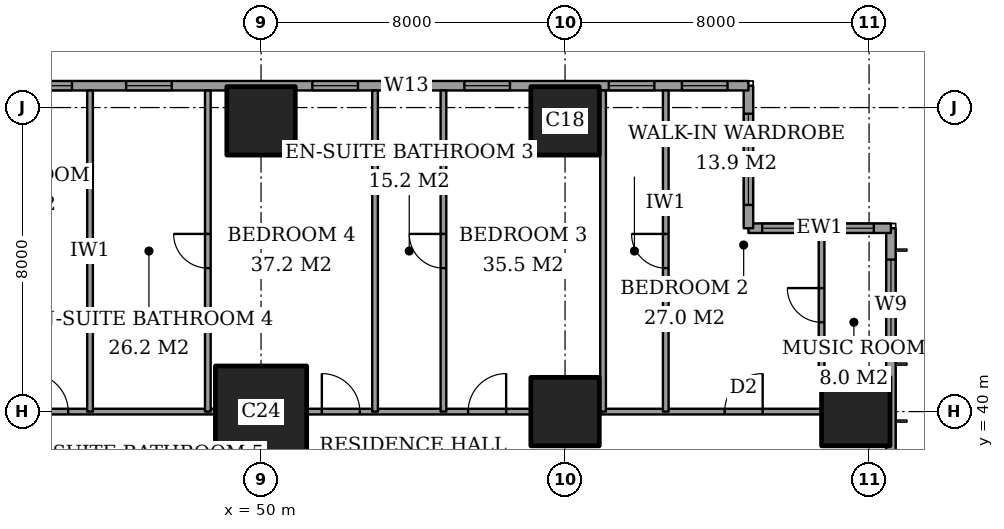
"""IFC4 building model, lengths in metres.
Left out: names, types, materials, properties, quantities, classifications, styles, units other than length and angle.
Written with IfcOpenShell. Run it as: python <this file> out.ifc"""

import sys

from ifc_helpers import new_model, si_unit, direction, frame, frame_2d, origin, origin_2d, place, context, subcontext, project, spatial, rectangle, extrude, element, fill, save


model = new_model("IFC4")
c1 = context("Model", 3, precision=1e-05, world=origin(), true_north=direction((0.0, 1.0)))
c2 = subcontext(c1, "Body", "Model", "MODEL_VIEW")
j1 = project(units=[si_unit("LENGTHUNIT", "METRE"), si_unit("PLANEANGLEUNIT", "RADIAN")], contexts=[c1])
p1 = place(None, origin())
s1 = spatial("IfcSite", under=j1, at=p1, CompositionType="ELEMENT")
p2 = place(p1, origin())
s2 = spatial("IfcBuilding", under=s1, at=p2, CompositionType="ELEMENT")
p3 = place(p2, frame((0.0, 0.0, 189.4)))
s3 = spatial("IfcBuildingStorey", under=s2, at=p3, CompositionType="ELEMENT", Elevation=189.4)
p4 = place(p3, frame((50.0, 40.0, 0.0), z_axis=(0.0, 0.0, 1.0), x_axis=(1.0, 0.0, 0.0)))
e1 = element("IfcColumn", 1, at=p4, inside=s3, PredefinedType="COLUMN", context=c2, shape_type="SweptSolid", body=[
    extrude(rectangle(XDim=2.4, YDim=2.4, at=origin_2d()), origin(), (0.0, 0.0, 1.0), 3.6),
])
for number, where, z_axis, x_axis in (
    (2, (50.0, 47.65, 0.0), (0.0, 0.0, 1.0), (1.0, 0.0, 0.0)),
    (3, (58.0, 40.0, 0.0), (0.0, 0.0, 1.0), (1.0, 0.0, 0.0)),
    (4, (58.0, 47.65, 0.0), (0.0, 0.0, 1.0), (1.0, 0.0, 0.0)),
    (5, (65.65, 40.0, 0.0), (0.0, 0.0, 1.0), (1.0, 0.0, 0.0)),
):
    element("IfcColumn", number, at=place(p3, frame(where, z_axis=z_axis, x_axis=x_axis)), inside=s3, PredefinedType="COLUMN", context=c2, shape_type="SweptSolid", body=[
        extrude(rectangle(XDim=1.8, YDim=1.8, at=origin_2d()), origin(), (0.0, 0.0, 1.0), 3.6),
    ])
p5 = place(p3, frame((66.575, 3.175, 0.0), z_axis=(0.0, 0.0, 1.0), x_axis=(0.0, 1.0, 0.0)))
e6 = element("IfcWall", 6, at=p5, inside=s3, PredefinedType="SOLIDWALL", context=c2, shape_type="SweptSolid", body=[
    extrude(rectangle(XDim=41.65, YDim=0.25, at=frame_2d((20.825, 0.0))), origin(), (0.0, 0.0, 1.0), 3.6),
])
p6 = place(p5, frame((0.825, 0.0, 0.2)))
e7 = element("IfcOpeningElement", 7, at=p6, cuts=e6, PredefinedType="OPENING", context=c2, shape_type="SweptSolid", body=[
    extrude(rectangle(XDim=2.4, YDim=2.4, at=frame_2d((1.2, 1.2))), frame((0.0, 0.135, 0.0), z_axis=(0.0, -1.0, 0.0), x_axis=(1.0, 0.0, 0.0)), (0.0, 0.0, 1.0), 0.27),
])
p7 = place(p5, frame((6.6, 0.0, 0.2)))
e8 = element("IfcOpeningElement", 8, at=p7, cuts=e6, PredefinedType="OPENING", context=c2, shape_type="SweptSolid", body=[
    extrude(rectangle(XDim=1.2, YDim=2.4, at=frame_2d((0.6, 1.2))), frame((0.0, 0.135, 0.0), z_axis=(0.0, -1.0, 0.0), x_axis=(1.0, 0.0, 0.0)), (0.0, 0.0, 1.0), 0.27),
])
p8 = place(p5, frame((8.775, 0.0, 0.2)))
e9 = element("IfcOpeningElement", 9, at=p8, cuts=e6, PredefinedType="OPENING", context=c2, shape_type="SweptSolid", body=[
    extrude(rectangle(XDim=2.4, YDim=2.4, at=frame_2d((1.2, 1.2))), frame((0.0, 0.135, 0.0), z_axis=(0.0, -1.0, 0.0), x_axis=(1.0, 0.0, 0.0)), (0.0, 0.0, 1.0), 0.27),
])
p9 = place(p5, frame((15.675, 0.0, 0.2)))
e10 = element("IfcOpeningElement", 10, at=p9, cuts=e6, PredefinedType="OPENING", context=c2, shape_type="SweptSolid", body=[
    extrude(rectangle(XDim=2.4, YDim=2.4, at=frame_2d((1.2, 1.2))), frame((0.0, 0.135, 0.0), z_axis=(0.0, -1.0, 0.0), x_axis=(1.0, 0.0, 0.0)), (0.0, 0.0, 1.0), 0.27),
])
p10 = place(p5, frame((23.575, 0.0, 0.2)))
e11 = element("IfcOpeningElement", 11, at=p10, cuts=e6, PredefinedType="OPENING", context=c2, shape_type="SweptSolid", body=[
    extrude(rectangle(XDim=2.4, YDim=2.4, at=frame_2d((1.2, 1.2))), frame((0.0, 0.135, 0.0), z_axis=(0.0, -1.0, 0.0), x_axis=(1.0, 0.0, 0.0)), (0.0, 0.0, 1.0), 0.27),
])
p11 = place(p5, frame((30.775, 0.0, 0.2)))
e12 = element("IfcOpeningElement", 12, at=p11, cuts=e6, PredefinedType="OPENING", context=c2, shape_type="SweptSolid", body=[
    extrude(rectangle(XDim=2.4, YDim=2.4, at=frame_2d((1.2, 1.2))), frame((0.0, 0.135, 0.0), z_axis=(0.0, -1.0, 0.0), x_axis=(1.0, 0.0, 0.0)), (0.0, 0.0, 1.0), 0.27),
])
p12 = place(p5, frame((34.55, 0.0, 0.2)))
e13 = element("IfcOpeningElement", 13, at=p12, cuts=e6, PredefinedType="OPENING", context=c2, shape_type="SweptSolid", body=[
    extrude(rectangle(XDim=1.2, YDim=2.4, at=frame_2d((0.6, 1.2))), frame((0.0, 0.135, 0.0), z_axis=(0.0, -1.0, 0.0), x_axis=(1.0, 0.0, 0.0)), (0.0, 0.0, 1.0), 0.27),
])
p13 = place(p5, frame((38.425, 0.0, 0.2)))
e14 = element("IfcOpeningElement", 14, at=p13, cuts=e6, PredefinedType="OPENING", context=c2, shape_type="SweptSolid", body=[
    extrude(rectangle(XDim=2.4, YDim=2.4, at=frame_2d((1.2, 1.2))), frame((0.0, 0.135, 0.0), z_axis=(0.0, -1.0, 0.0), x_axis=(1.0, 0.0, 0.0)), (0.0, 0.0, 1.0), 0.27),
])
p14 = place(p3, frame((66.575, 44.825, 0.0), z_axis=(0.0, 0.0, 1.0), x_axis=(-1.0, 0.0, 0.0)))
e15 = element("IfcWall", 15, at=p14, inside=s3, PredefinedType="SOLIDWALL", context=c2, shape_type="SweptSolid", body=[
    extrude(rectangle(XDim=3.75, YDim=0.25, at=frame_2d((1.875, 0.0))), origin(), (0.0, 0.0, 1.0), 3.6),
])
p15 = place(p14, frame((0.45, 0.0, 0.2)))
e16 = element("IfcOpeningElement", 16, at=p15, cuts=e15, PredefinedType="OPENING", context=c2, shape_type="SweptSolid", body=[
    extrude(rectangle(XDim=1.2, YDim=2.4, at=frame_2d((0.6, 1.2))), frame((0.0, 0.135, 0.0), z_axis=(0.0, -1.0, 0.0), x_axis=(1.0, 0.0, 0.0)), (0.0, 0.0, 1.0), 0.27),
])
p16 = place(p14, frame((2.188, 0.0, 0.2)))
e17 = element("IfcOpeningElement", 17, at=p16, cuts=e15, PredefinedType="OPENING", context=c2, shape_type="SweptSolid", body=[
    extrude(rectangle(XDim=1.2, YDim=2.4, at=frame_2d((0.6, 1.2))), frame((0.0, 0.135, 0.0), z_axis=(0.0, -1.0, 0.0), x_axis=(1.0, 0.0, 0.0)), (0.0, 0.0, 1.0), 0.27),
])
p17 = place(p3, frame((62.825, 44.825, 0.0), z_axis=(0.0, 0.0, 1.0), x_axis=(0.0, 1.0, 0.0)))
e18 = element("IfcWall", 18, at=p17, inside=s3, PredefinedType="SOLIDWALL", context=c2, shape_type="SweptSolid", body=[
    extrude(rectangle(XDim=3.75, YDim=0.25, at=frame_2d((1.875, 0.0))), origin(), (0.0, 0.0, 1.0), 3.6),
])
p18 = place(p17, frame((0.613, 0.0, 0.2)))
e19 = element("IfcOpeningElement", 19, at=p18, cuts=e18, PredefinedType="OPENING", context=c2, shape_type="SweptSolid", body=[
    extrude(rectangle(XDim=2.4, YDim=2.4, at=frame_2d((1.2, 1.2))), frame((0.0, 0.135, 0.0), z_axis=(0.0, -1.0, 0.0), x_axis=(1.0, 0.0, 0.0)), (0.0, 0.0, 1.0), 0.27),
])
p19 = place(p3, frame((62.825, 48.575, 0.0), z_axis=(0.0, 0.0, 1.0), x_axis=(-1.0, 0.0, 0.0)))
e20 = element("IfcWall", 20, at=p19, inside=s3, PredefinedType="SOLIDWALL", context=c2, shape_type="SweptSolid", body=[
    extrude(rectangle(XDim=21.4, YDim=0.25, at=frame_2d((10.7, 0.0))), origin(), (0.0, 0.0, 1.0), 3.6),
])
p20 = place(p19, frame((0.55, 0.0, 0.2)))
e21 = element("IfcOpeningElement", 21, at=p20, cuts=e20, PredefinedType="OPENING", context=c2, shape_type="SweptSolid", body=[
    extrude(rectangle(XDim=1.2, YDim=2.4, at=frame_2d((0.6, 1.2))), frame((0.0, 0.135, 0.0), z_axis=(0.0, -1.0, 0.0), x_axis=(1.0, 0.0, 0.0)), (0.0, 0.0, 1.0), 0.27),
])
p21 = place(p19, frame((2.475, 0.0, 0.2)))
e22 = element("IfcOpeningElement", 22, at=p21, cuts=e20, PredefinedType="OPENING", context=c2, shape_type="SweptSolid", body=[
    extrude(rectangle(XDim=1.2, YDim=2.4, at=frame_2d((0.6, 1.2))), frame((0.0, 0.135, 0.0), z_axis=(0.0, -1.0, 0.0), x_axis=(1.0, 0.0, 0.0)), (0.0, 0.0, 1.0), 0.27),
])
p22 = place(p19, frame((6.275, 0.0, 0.2)))
e23 = element("IfcOpeningElement", 23, at=p22, cuts=e20, PredefinedType="OPENING", context=c2, shape_type="SweptSolid", body=[
    extrude(rectangle(XDim=1.2, YDim=2.4, at=frame_2d((0.6, 1.2))), frame((0.0, 0.135, 0.0), z_axis=(0.0, -1.0, 0.0), x_axis=(1.0, 0.0, 0.0)), (0.0, 0.0, 1.0), 0.27),
])
p23 = place(p19, frame((8.4, 0.0, 0.2)))
e24 = element("IfcOpeningElement", 24, at=p23, cuts=e20, PredefinedType="OPENING", context=c2, shape_type="SweptSolid", body=[
    extrude(rectangle(XDim=1.2, YDim=2.4, at=frame_2d((0.6, 1.2))), frame((0.0, 0.135, 0.0), z_axis=(0.0, -1.0, 0.0), x_axis=(1.0, 0.0, 0.0)), (0.0, 0.0, 1.0), 0.27),
])
p24 = place(p19, frame((10.275, 0.0, 0.2)))
e25 = element("IfcOpeningElement", 25, at=p24, cuts=e20, PredefinedType="OPENING", context=c2, shape_type="SweptSolid", body=[
    extrude(rectangle(XDim=1.2, YDim=2.4, at=frame_2d((0.6, 1.2))), frame((0.0, 0.135, 0.0), z_axis=(0.0, -1.0, 0.0), x_axis=(1.0, 0.0, 0.0)), (0.0, 0.0, 1.0), 0.27),
])
p25 = place(p19, frame((15.175, 0.0, 0.2)))
e26 = element("IfcOpeningElement", 26, at=p25, cuts=e20, PredefinedType="OPENING", context=c2, shape_type="SweptSolid", body=[
    extrude(rectangle(XDim=1.2, YDim=2.4, at=frame_2d((0.6, 1.2))), frame((0.0, 0.135, 0.0), z_axis=(0.0, -1.0, 0.0), x_axis=(1.0, 0.0, 0.0)), (0.0, 0.0, 1.0), 0.27),
])
p26 = place(p19, frame((17.8, 0.0, 0.2)))
e27 = element("IfcOpeningElement", 27, at=p26, cuts=e20, PredefinedType="OPENING", context=c2, shape_type="SweptSolid", body=[
    extrude(rectangle(XDim=1.2, YDim=2.4, at=frame_2d((0.6, 1.2))), frame((0.0, 0.135, 0.0), z_axis=(0.0, -1.0, 0.0), x_axis=(1.0, 0.0, 0.0)), (0.0, 0.0, 1.0), 0.27),
])
p27 = place(p3, frame((43.35, 40.0, 0.0), z_axis=(0.0, 0.0, 1.0), x_axis=(1.0, 0.0, 0.0)))
e28 = element("IfcWall", 28, at=p27, inside=s3, PredefinedType="PARTITIONING", context=c2, shape_type="SweptSolid", body=[
    extrude(rectangle(XDim=5.45, YDim=0.15, at=frame_2d((2.725, 0.0))), origin(), (0.0, 0.0, 1.0), 3.35),
])
p28 = place(p27, frame((0.575, 0.0, 0.0)))
e29 = element("IfcOpeningElement", 29, at=p28, cuts=e28, PredefinedType="OPENING", context=c2, shape_type="SweptSolid", body=[
    extrude(rectangle(XDim=1.0, YDim=2.1, at=frame_2d((0.5, 1.05))), frame((0.0, 0.085, 0.0), z_axis=(0.0, -1.0, 0.0), x_axis=(1.0, 0.0, 0.0)), (0.0, 0.0, 1.0), 0.17),
])
p29 = place(p3, frame((51.2, 40.0, 0.0), z_axis=(0.0, 0.0, 1.0), x_axis=(1.0, 0.0, 0.0)))
e30 = element("IfcWall", 30, at=p29, inside=s3, PredefinedType="PARTITIONING", context=c2, shape_type="SweptSolid", body=[
    extrude(rectangle(XDim=5.9, YDim=0.15, at=frame_2d((2.95, 0.0))), origin(), (0.0, 0.0, 1.0), 3.35),
])
p30 = place(p29, frame((4.25, 0.0, 0.0)))
e31 = element("IfcOpeningElement", 31, at=p30, cuts=e30, PredefinedType="OPENING", context=c2, shape_type="SweptSolid", body=[
    extrude(rectangle(XDim=1.0, YDim=2.1, at=frame_2d((0.5, 1.05))), frame((0.0, 0.085, 0.0), z_axis=(0.0, -1.0, 0.0), x_axis=(1.0, 0.0, 0.0)), (0.0, 0.0, 1.0), 0.17),
])
p31 = place(p29, frame((0.4, 0.0, 0.0)))
e32 = element("IfcOpeningElement", 32, at=p31, cuts=e30, PredefinedType="OPENING", context=c2, shape_type="SweptSolid", body=[
    extrude(rectangle(XDim=1.0, YDim=2.1, at=frame_2d((0.5, 1.05))), frame((0.0, 0.085, 0.0), z_axis=(0.0, -1.0, 0.0), x_axis=(1.0, 0.0, 0.0)), (0.0, 0.0, 1.0), 0.17),
])
p32 = place(p3, frame((58.9, 40.0, 0.0), z_axis=(0.0, 0.0, 1.0), x_axis=(1.0, 0.0, 0.0)))
e33 = element("IfcWall", 33, at=p32, inside=s3, PredefinedType="PARTITIONING", context=c2, shape_type="SweptSolid", body=[
    extrude(rectangle(XDim=5.85, YDim=0.15, at=frame_2d((2.925, 0.0))), origin(), (0.0, 0.0, 1.0), 3.35),
])
p33 = place(p32, frame((3.3, 0.0, 0.0)))
e34 = element("IfcOpeningElement", 34, at=p33, cuts=e33, PredefinedType="OPENING", context=c2, shape_type="SweptSolid", body=[
    extrude(rectangle(XDim=1.0, YDim=2.1, at=frame_2d((0.5, 1.05))), frame((0.0, 0.085, 0.0), z_axis=(0.0, -1.0, 0.0), x_axis=(1.0, 0.0, 0.0)), (0.0, 0.0, 1.0), 0.17),
])
p34 = place(p3, frame((45.5, 40.0, 0.0), z_axis=(0.0, 0.0, 1.0), x_axis=(0.0, 1.0, 0.0)))
e35 = element("IfcWall", 35, at=p34, inside=s3, PredefinedType="PARTITIONING", context=c2, shape_type="SweptSolid", body=[
    extrude(rectangle(XDim=8.45, YDim=0.15, at=frame_2d((4.225, 0.0))), origin(), (0.0, 0.0, 1.0), 3.35),
])
p35 = place(p3, frame((48.6, 40.0, 0.0), z_axis=(0.0, 0.0, 1.0), x_axis=(0.0, 1.0, 0.0)))
e36 = element("IfcWall", 36, at=p35, inside=s3, PredefinedType="PARTITIONING", context=c2, shape_type="SweptSolid", body=[
    extrude(rectangle(XDim=8.45, YDim=0.15, at=frame_2d((4.225, 0.0))), origin(), (0.0, 0.0, 1.0), 3.35),
])
p36 = place(p35, frame((3.775, 0.0, 0.0)))
e37 = element("IfcOpeningElement", 37, at=p36, cuts=e36, PredefinedType="OPENING", context=c2, shape_type="SweptSolid", body=[
    extrude(rectangle(XDim=0.9, YDim=2.1, at=frame_2d((0.45, 1.05))), frame((0.0, 0.085, 0.0), z_axis=(0.0, -1.0, 0.0), x_axis=(1.0, 0.0, 0.0)), (0.0, 0.0, 1.0), 0.17),
])
p37 = place(p3, frame((53.0, 40.0, 0.0), z_axis=(0.0, 0.0, 1.0), x_axis=(0.0, 1.0, 0.0)))
e38 = element("IfcWall", 38, at=p37, inside=s3, PredefinedType="PARTITIONING", context=c2, shape_type="SweptSolid", body=[
    extrude(rectangle(XDim=8.45, YDim=0.15, at=frame_2d((4.225, 0.0))), origin(), (0.0, 0.0, 1.0), 3.35),
])
p38 = place(p3, frame((54.8, 40.0, 0.0), z_axis=(0.0, 0.0, 1.0), x_axis=(0.0, 1.0, 0.0)))
e39 = element("IfcWall", 39, at=p38, inside=s3, PredefinedType="PARTITIONING", context=c2, shape_type="SweptSolid", body=[
    extrude(rectangle(XDim=8.45, YDim=0.15, at=frame_2d((4.225, 0.0))), origin(), (0.0, 0.0, 1.0), 3.35),
])
p39 = place(p38, frame((3.775, 0.0, 0.0)))
e40 = element("IfcOpeningElement", 40, at=p39, cuts=e39, PredefinedType="OPENING", context=c2, shape_type="SweptSolid", body=[
    extrude(rectangle(XDim=0.9, YDim=2.1, at=frame_2d((0.45, 1.05))), frame((0.0, 0.085, 0.0), z_axis=(0.0, -1.0, 0.0), x_axis=(1.0, 0.0, 0.0)), (0.0, 0.0, 1.0), 0.17),
])
p40 = place(p3, frame((59.0, 40.0, 0.0), z_axis=(0.0, 0.0, 1.0), x_axis=(0.0, 1.0, 0.0)))
e41 = element("IfcWall", 41, at=p40, inside=s3, PredefinedType="PARTITIONING", context=c2, shape_type="SweptSolid", body=[
    extrude(rectangle(XDim=8.45, YDim=0.15, at=frame_2d((4.225, 0.0))), origin(), (0.0, 0.0, 1.0), 3.35),
])
p41 = place(p3, frame((60.65, 40.0, 0.0), z_axis=(0.0, 0.0, 1.0), x_axis=(0.0, 1.0, 0.0)))
e42 = element("IfcWall", 42, at=p41, inside=s3, PredefinedType="PARTITIONING", context=c2, shape_type="SweptSolid", body=[
    extrude(rectangle(XDim=8.45, YDim=0.15, at=frame_2d((4.225, 0.0))), origin(), (0.0, 0.0, 1.0), 3.35),
])
p42 = place(p41, frame((3.775, 0.0, 0.0)))
e43 = element("IfcOpeningElement", 43, at=p42, cuts=e42, PredefinedType="OPENING", context=c2, shape_type="SweptSolid", body=[
    extrude(rectangle(XDim=0.9, YDim=2.1, at=frame_2d((0.45, 1.05))), frame((0.0, 0.085, 0.0), z_axis=(0.0, -1.0, 0.0), x_axis=(1.0, 0.0, 0.0)), (0.0, 0.0, 1.0), 0.17),
])
p43 = place(p3, frame((64.75, 40.9, 0.0), z_axis=(0.0, 0.0, 1.0), x_axis=(0.0, 1.0, 0.0)))
e44 = element("IfcWall", 44, at=p43, inside=s3, PredefinedType="PARTITIONING", context=c2, shape_type="SweptSolid", body=[
    extrude(rectangle(XDim=3.8, YDim=0.15, at=frame_2d((1.9, 0.0))), origin(), (0.0, 0.0, 1.0), 3.35),
])
p44 = place(p43, frame((1.45, 0.0, 0.0)))
e45 = element("IfcOpeningElement", 45, at=p44, cuts=e44, PredefinedType="OPENING", context=c2, shape_type="SweptSolid", body=[
    extrude(rectangle(XDim=0.9, YDim=2.1, at=frame_2d((0.45, 1.05))), frame((0.0, 0.085, 0.0), z_axis=(0.0, -1.0, 0.0), x_axis=(1.0, 0.0, 0.0)), (0.0, 0.0, 1.0), 0.17),
])
p45 = place(p13, origin())
e46 = element("IfcWindow", 46, at=p45, inside=s3, PartitioningType="SINGLE_PANEL", PredefinedType="WINDOW", context=c2, shape_type="SweptSolid", body=[
    extrude(rectangle(XDim=2.4, YDim=2.4, at=frame_2d((1.2, 1.2))), frame((0.0, 0.03, 0.0), z_axis=(0.0, -1.0, 0.0), x_axis=(1.0, 0.0, 0.0)), (0.0, 0.0, 1.0), 0.06),
])
fill(e14, e46)
p46 = place(p15, origin())
e47 = element("IfcWindow", 47, at=p46, inside=s3, PartitioningType="SINGLE_PANEL", PredefinedType="WINDOW", context=c2, shape_type="SweptSolid", body=[
    extrude(rectangle(XDim=1.2, YDim=2.4, at=frame_2d((0.6, 1.2))), frame((0.0, 0.03, 0.0), z_axis=(0.0, -1.0, 0.0), x_axis=(1.0, 0.0, 0.0)), (0.0, 0.0, 1.0), 0.06),
])
fill(e16, e47)
p47 = place(p16, origin())
e48 = element("IfcWindow", 48, at=p47, inside=s3, PartitioningType="SINGLE_PANEL", PredefinedType="WINDOW", context=c2, shape_type="SweptSolid", body=[
    extrude(rectangle(XDim=1.2, YDim=2.4, at=frame_2d((0.6, 1.2))), frame((0.0, 0.03, 0.0), z_axis=(0.0, -1.0, 0.0), x_axis=(1.0, 0.0, 0.0)), (0.0, 0.0, 1.0), 0.06),
])
fill(e17, e48)
p48 = place(p18, origin())
e49 = element("IfcWindow", 49, at=p48, inside=s3, PartitioningType="SINGLE_PANEL", PredefinedType="WINDOW", context=c2, shape_type="SweptSolid", body=[
    extrude(rectangle(XDim=2.4, YDim=2.4, at=frame_2d((1.2, 1.2))), frame((0.0, 0.03, 0.0), z_axis=(0.0, -1.0, 0.0), x_axis=(1.0, 0.0, 0.0)), (0.0, 0.0, 1.0), 0.06),
])
fill(e19, e49)
p49 = place(p20, origin())
e50 = element("IfcWindow", 50, at=p49, inside=s3, PartitioningType="SINGLE_PANEL", PredefinedType="WINDOW", context=c2, shape_type="SweptSolid", body=[
    extrude(rectangle(XDim=1.2, YDim=2.4, at=frame_2d((0.6, 1.2))), frame((0.0, 0.03, 0.0), z_axis=(0.0, -1.0, 0.0), x_axis=(1.0, 0.0, 0.0)), (0.0, 0.0, 1.0), 0.06),
])
fill(e21, e50)
p50 = place(p21, origin())
e51 = element("IfcWindow", 51, at=p50, inside=s3, PartitioningType="SINGLE_PANEL", PredefinedType="WINDOW", context=c2, shape_type="SweptSolid", body=[
    extrude(rectangle(XDim=1.2, YDim=2.4, at=frame_2d((0.6, 1.2))), frame((0.0, 0.03, 0.0), z_axis=(0.0, -1.0, 0.0), x_axis=(1.0, 0.0, 0.0)), (0.0, 0.0, 1.0), 0.06),
])
fill(e22, e51)
p51 = place(p22, origin())
e52 = element("IfcWindow", 52, at=p51, inside=s3, PartitioningType="SINGLE_PANEL", PredefinedType="WINDOW", context=c2, shape_type="SweptSolid", body=[
    extrude(rectangle(XDim=1.2, YDim=2.4, at=frame_2d((0.6, 1.2))), frame((0.0, 0.03, 0.0), z_axis=(0.0, -1.0, 0.0), x_axis=(1.0, 0.0, 0.0)), (0.0, 0.0, 1.0), 0.06),
])
fill(e23, e52)
p52 = place(p23, origin())
e53 = element("IfcWindow", 53, at=p52, inside=s3, PartitioningType="SINGLE_PANEL", PredefinedType="WINDOW", context=c2, shape_type="SweptSolid", body=[
    extrude(rectangle(XDim=1.2, YDim=2.4, at=frame_2d((0.6, 1.2))), frame((0.0, 0.03, 0.0), z_axis=(0.0, -1.0, 0.0), x_axis=(1.0, 0.0, 0.0)), (0.0, 0.0, 1.0), 0.06),
])
fill(e24, e53)
p53 = place(p24, origin())
e54 = element("IfcWindow", 54, at=p53, inside=s3, PartitioningType="SINGLE_PANEL", PredefinedType="WINDOW", context=c2, shape_type="SweptSolid", body=[
    extrude(rectangle(XDim=1.2, YDim=2.4, at=frame_2d((0.6, 1.2))), frame((0.0, 0.03, 0.0), z_axis=(0.0, -1.0, 0.0), x_axis=(1.0, 0.0, 0.0)), (0.0, 0.0, 1.0), 0.06),
])
fill(e25, e54)
p54 = place(p25, origin())
e55 = element("IfcWindow", 55, at=p54, inside=s3, PartitioningType="SINGLE_PANEL", PredefinedType="WINDOW", context=c2, shape_type="SweptSolid", body=[
    extrude(rectangle(XDim=1.2, YDim=2.4, at=frame_2d((0.6, 1.2))), frame((0.0, 0.03, 0.0), z_axis=(0.0, -1.0, 0.0), x_axis=(1.0, 0.0, 0.0)), (0.0, 0.0, 1.0), 0.06),
])
fill(e26, e55)
p55 = place(p26, origin())
e56 = element("IfcWindow", 56, at=p55, inside=s3, PartitioningType="SINGLE_PANEL", PredefinedType="WINDOW", context=c2, shape_type="SweptSolid", body=[
    extrude(rectangle(XDim=1.2, YDim=2.4, at=frame_2d((0.6, 1.2))), frame((0.0, 0.03, 0.0), z_axis=(0.0, -1.0, 0.0), x_axis=(1.0, 0.0, 0.0)), (0.0, 0.0, 1.0), 0.06),
])
fill(e27, e56)
p56 = place(p44, origin())
e57 = element("IfcDoor", 57, at=p56, inside=s3, OperationType="SINGLE_SWING_LEFT", PredefinedType="DOOR", context=c2, shape_type="SweptSolid", body=[
    extrude(rectangle(XDim=0.9, YDim=2.1, at=frame_2d((0.45, 1.05))), frame((0.0, 0.025, 0.0), z_axis=(0.0, -1.0, 0.0), x_axis=(1.0, 0.0, 0.0)), (0.0, 0.0, 1.0), 0.05),
])
fill(e45, e57)
p57 = place(p33, origin())
e58 = element("IfcDoor", 58, at=p57, inside=s3, OperationType="SINGLE_SWING_LEFT", PredefinedType="DOOR", context=c2, shape_type="SweptSolid", body=[
    extrude(rectangle(XDim=1.0, YDim=2.1, at=frame_2d((0.5, 1.05))), frame((0.0, 0.025, 0.0), z_axis=(0.0, -1.0, 0.0), x_axis=(1.0, 0.0, 0.0)), (0.0, 0.0, 1.0), 0.05),
])
fill(e34, e58)
p58 = place(p42, origin())
e59 = element("IfcDoor", 59, at=p58, inside=s3, OperationType="SINGLE_SWING_LEFT", PredefinedType="DOOR", context=c2, shape_type="SweptSolid", body=[
    extrude(rectangle(XDim=0.9, YDim=2.1, at=frame_2d((0.45, 1.05))), frame((0.0, 0.025, 0.0), z_axis=(0.0, -1.0, 0.0), x_axis=(1.0, 0.0, 0.0)), (0.0, 0.0, 1.0), 0.05),
])
fill(e43, e59)
p59 = place(p30, origin())
e60 = element("IfcDoor", 60, at=p59, inside=s3, OperationType="SINGLE_SWING_LEFT", PredefinedType="DOOR", context=c2, shape_type="SweptSolid", body=[
    extrude(rectangle(XDim=1.0, YDim=2.1, at=frame_2d((0.5, 1.05))), frame((0.0, 0.025, 0.0), z_axis=(0.0, -1.0, 0.0), x_axis=(1.0, 0.0, 0.0)), (0.0, 0.0, 1.0), 0.05),
])
fill(e31, e60)
p60 = place(p39, origin())
e61 = element("IfcDoor", 61, at=p60, inside=s3, OperationType="SINGLE_SWING_LEFT", PredefinedType="DOOR", context=c2, shape_type="SweptSolid", body=[
    extrude(rectangle(XDim=0.9, YDim=2.1, at=frame_2d((0.45, 1.05))), frame((0.0, 0.025, 0.0), z_axis=(0.0, -1.0, 0.0), x_axis=(1.0, 0.0, 0.0)), (0.0, 0.0, 1.0), 0.05),
])
fill(e40, e61)
p61 = place(p31, origin())
e62 = element("IfcDoor", 62, at=p61, inside=s3, OperationType="SINGLE_SWING_RIGHT", PredefinedType="DOOR", context=c2, shape_type="SweptSolid", body=[
    extrude(rectangle(XDim=1.0, YDim=2.1, at=frame_2d((0.5, 1.05))), frame((0.0, 0.025, 0.0), z_axis=(0.0, -1.0, 0.0), x_axis=(1.0, 0.0, 0.0)), (0.0, 0.0, 1.0), 0.05),
])
fill(e32, e62)
p62 = place(p36, origin())
e63 = element("IfcDoor", 63, at=p62, inside=s3, OperationType="SINGLE_SWING_LEFT", PredefinedType="DOOR", context=c2, shape_type="SweptSolid", body=[
    extrude(rectangle(XDim=0.9, YDim=2.1, at=frame_2d((0.45, 1.05))), frame((0.0, 0.025, 0.0), z_axis=(0.0, -1.0, 0.0), x_axis=(1.0, 0.0, 0.0)), (0.0, 0.0, 1.0), 0.05),
])
fill(e37, e63)
p63 = place(p28, origin())
e64 = element("IfcDoor", 64, at=p63, inside=s3, OperationType="SINGLE_SWING_RIGHT", PredefinedType="DOOR", context=c2, shape_type="SweptSolid", body=[
    extrude(rectangle(XDim=1.0, YDim=2.1, at=frame_2d((0.5, 1.05))), frame((0.0, 0.025, 0.0), z_axis=(0.0, -1.0, 0.0), x_axis=(1.0, 0.0, 0.0)), (0.0, 0.0, 1.0), 0.05),
])
fill(e29, e64)
save(model, sys.argv[1])
